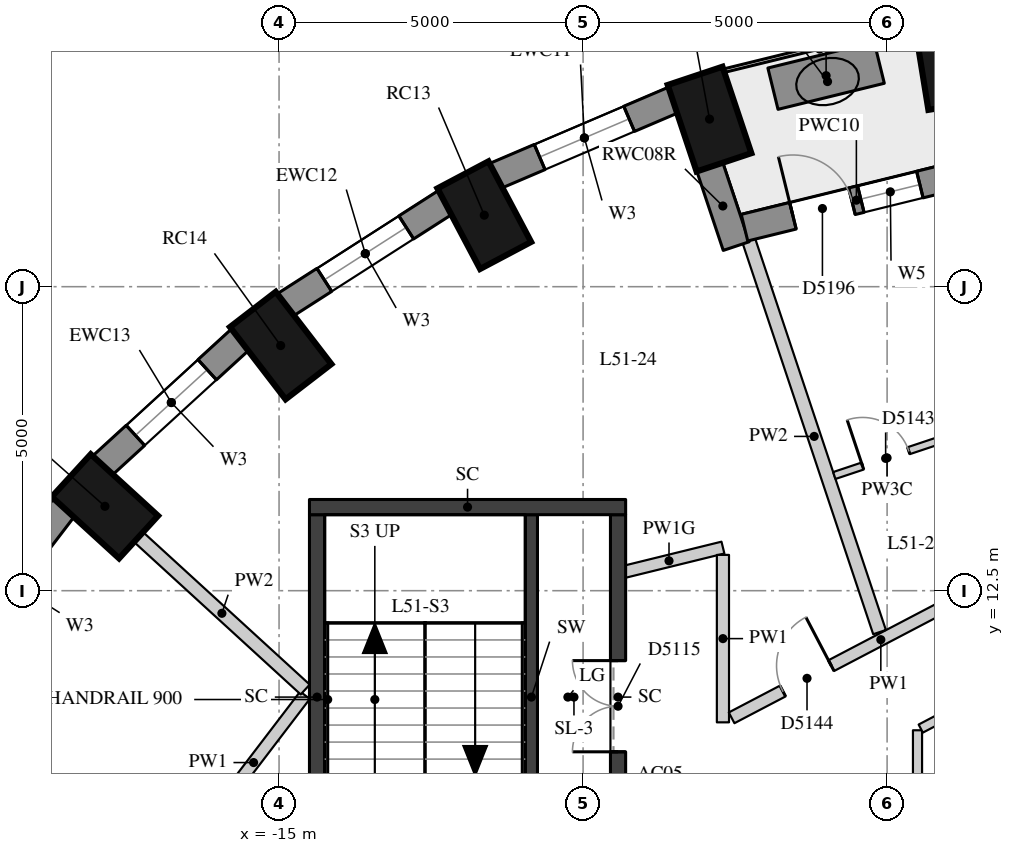
"""IFC4 building model, lengths in metres.
Left out: names, types, materials, properties, quantities, classifications, styles, units other than length and angle.
Written with IfcOpenShell. Run it as: python <this file> out.ifc"""

import sys

from ifc_helpers import new_model, si_unit, direction, frame, frame_2d, origin, origin_2d, place, context, subcontext, project, spatial, rectangle, extrude, element, fill, save


model = new_model("IFC4")
c1 = context("Model", 3, precision=1e-05, world=origin(), true_north=direction((0.0, 1.0)))
c2 = subcontext(c1, "Body", "Model", "MODEL_VIEW")
j1 = project(units=[si_unit("LENGTHUNIT", "METRE"), si_unit("PLANEANGLEUNIT", "RADIAN")], contexts=[c1])
p1 = place(None, origin())
s1 = spatial("IfcSite", under=j1, at=p1, CompositionType="ELEMENT")
p2 = place(p1, origin())
s2 = spatial("IfcBuilding", under=s1, at=p2, CompositionType="ELEMENT")
p3 = place(p2, frame((0.0, 0.0, 181.4)))
s3 = spatial("IfcBuildingStorey", under=s2, at=p3, CompositionType="ELEMENT", Elevation=181.4)
for number, where, z_axis, x_axis in (
    (1, (-3.972, 21.224, 0.0), (0.0, 0.0, 1.0), (-0.16, 0.987, 0.0)),
    (2, (-7.92, 20.256, 0.0), (0.0, 0.0, 1.0), (-0.317, 0.949, 0.0)),
    (3, (-11.625, 18.676, 0.0), (0.0, 0.0, 1.0), (-0.468, 0.884, 0.0)),
    (4, (-14.973, 16.532, 0.0), (0.0, 0.0, 1.0), (-0.61, 0.792, 0.0)),
    (5, (-17.864, 13.888, 0.0), (0.0, 0.0, 1.0), (-0.738, 0.675, 0.0)),
):
    element("IfcColumn", number, at=place(p3, frame(where, z_axis=z_axis, x_axis=x_axis)), inside=s3, PredefinedType="COLUMN", context=c2, shape_type="SweptSolid", body=[
        extrude(rectangle(XDim=1.5, YDim=0.95, at=origin_2d()), origin(), (0.0, 0.0, 1.0), 3.3),
    ])
p4 = place(p3, frame((-8.506, 20.574, 0.0), z_axis=(0.0, 0.0, 1.0), x_axis=(-0.919798725687, -0.392390499663, 0.0)))
e6 = element("IfcWall", 6, at=p4, inside=s3, PredefinedType="SOLIDWALL", context=c2, shape_type="SweptSolid", body=[
    extrude(rectangle(XDim=3.2, YDim=0.45, at=frame_2d((1.6, 0.0))), origin(), (0.0, 0.0, 1.0), 2.85),
])
p5 = place(p4, frame((0.8, 0.0, 0.4)))
e7 = element("IfcOpeningElement", 7, at=p5, cuts=e6, PredefinedType="OPENING", context=c2, shape_type="SweptSolid", body=[
    extrude(rectangle(XDim=1.6, YDim=1.75, at=frame_2d((0.8, 0.875))), frame((0.0, 0.235, 0.0), z_axis=(0.0, -1.0, 0.0), x_axis=(1.0, 0.0, 0.0)), (0.0, 0.0, 1.0), 0.47),
])
p6 = place(p3, frame((-12.255, 18.893, 0.0), z_axis=(0.0, 0.0, 1.0), x_axis=(-0.842030726237, -0.539429565442, 0.0)))
e8 = element("IfcWall", 8, at=p6, inside=s3, PredefinedType="SOLIDWALL", context=c2, shape_type="SweptSolid", body=[
    extrude(rectangle(XDim=3.151, YDim=0.45, at=frame_2d((1.576, 0.0))), origin(), (0.0, 0.0, 1.0), 2.85),
])
p7 = place(p6, frame((0.776, 0.0, 0.4)))
e9 = element("IfcOpeningElement", 9, at=p7, cuts=e8, PredefinedType="OPENING", context=c2, shape_type="SweptSolid", body=[
    extrude(rectangle(XDim=1.6, YDim=1.75, at=frame_2d((0.8, 0.875))), frame((0.0, 0.235, 0.0), z_axis=(0.0, -1.0, 0.0), x_axis=(1.0, 0.0, 0.0)), (0.0, 0.0, 1.0), 0.47),
])
p8 = place(p3, frame((-15.63, 16.639, 0.0), z_axis=(0.0, 0.0, 1.0), x_axis=(-0.737808755941, -0.675009807082, 0.0)))
e10 = element("IfcWall", 10, at=p8, inside=s3, PredefinedType="SOLIDWALL", context=c2, shape_type="SweptSolid", body=[
    extrude(rectangle(XDim=3.094, YDim=0.45, at=frame_2d((1.547, 0.0))), origin(), (0.0, 0.0, 1.0), 2.85),
])
p9 = place(p8, frame((0.747, 0.0, 0.4)))
e11 = element("IfcOpeningElement", 11, at=p9, cuts=e10, PredefinedType="OPENING", context=c2, shape_type="SweptSolid", body=[
    extrude(rectangle(XDim=1.6, YDim=1.75, at=frame_2d((0.8, 0.875))), frame((0.0, 0.235, 0.0), z_axis=(0.0, -1.0, 0.0), x_axis=(1.0, 0.0, 0.0)), (0.0, 0.0, 1.0), 0.47),
])
p10 = place(p3, frame((-18.528, 13.879, 0.0), z_axis=(0.0, 0.0, 1.0), x_axis=(-0.607817056371, -0.794077090706, 0.0)))
e12 = element("IfcWall", 12, at=p10, inside=s3, PredefinedType="SOLIDWALL", context=c2, shape_type="SweptSolid", body=[
    extrude(rectangle(XDim=3.037, YDim=0.45, at=frame_2d((1.519, 0.0))), origin(), (0.0, 0.0, 1.0), 2.85),
])
p11 = place(p10, frame((0.719, 0.0, 0.4)))
e13 = element("IfcOpeningElement", 13, at=p11, cuts=e12, PredefinedType="OPENING", context=c2, shape_type="SweptSolid", body=[
    extrude(rectangle(XDim=1.6, YDim=1.75, at=frame_2d((0.8, 0.875))), frame((0.0, 0.235, 0.0), z_axis=(0.0, -1.0, 0.0), x_axis=(1.0, 0.0, 0.0)), (0.0, 0.0, 1.0), 0.47),
])
p12 = place(p3, frame((-7.922, 19.486, 0.0), z_axis=(0.0, 0.0, 1.0), x_axis=(0.316649231286, -0.948542705589, 0.0)))
e14 = element("IfcWall", 14, at=p12, inside=s3, PredefinedType="SOLIDWALL", context=c2, shape_type="SweptSolid", body=[
    extrude(rectangle(XDim=1.39, YDim=0.45, at=frame_2d((0.695, 0.0))), origin(), (0.0, 0.0, 1.0), 2.85),
])
p13 = place(p3, frame((-3.665, 19.375, 0.0), z_axis=(0.0, 0.0, 1.0), x_axis=(-0.97110866251, -0.238637728782, 0.0)))
e15 = element("IfcWall", 15, at=p13, inside=s3, PredefinedType="SOLIDWALL", context=c2, shape_type="SweptSolid", body=[
    extrude(rectangle(XDim=3.789, YDim=0.45, at=frame_2d((1.895, 0.0))), origin(), (0.0, 0.0, 1.0), 2.85),
])
p14 = place(p13, frame((0.82, 0.0, 0.4)))
e16 = element("IfcOpeningElement", 16, at=p14, cuts=e15, PredefinedType="OPENING", context=c2, shape_type="SweptSolid", body=[
    extrude(rectangle(XDim=1.0, YDim=1.75, at=frame_2d((0.5, 0.875))), frame((0.0, 0.235, 0.0), z_axis=(0.0, -1.0, 0.0), x_axis=(1.0, 0.0, 0.0)), (0.0, 0.0, 1.0), 0.47),
])
p15 = place(p13, frame((1.97, 0.0, 0.0)))
e17 = element("IfcOpeningElement", 17, at=p15, cuts=e15, PredefinedType="OPENING", context=c2, shape_type="SweptSolid", body=[
    extrude(rectangle(XDim=1.0, YDim=2.15, at=frame_2d((0.5, 1.075))), frame((0.0, 0.235, 0.0), z_axis=(0.0, -1.0, 0.0), x_axis=(1.0, 0.0, 0.0)), (0.0, 0.0, 1.0), 0.47),
])
p16 = place(p3, frame((-5.129, 21.185, 0.0), z_axis=(0.0, 0.0, 1.0), x_axis=(-0.971257007956, -0.238033242419, 0.0)))
e18 = element("IfcWall", 18, at=p16, inside=s3, PredefinedType="USERDEFINED", context=c2, shape_type="SweptSolid", body=[
    extrude(rectangle(XDim=1.8, YDim=0.7, at=frame_2d((0.9, 0.0))), origin(), (0.0, 0.0, 1.0), 0.75),
])
p17 = place(p3, frame((-10.85, 7.75, 0.0), z_axis=(0.0, 0.0, 1.0), x_axis=(0.0, 1.0, 0.0)))
e19 = element("IfcWall", 19, at=p17, inside=s3, PredefinedType="SHEAR", context=c2, shape_type="SweptSolid", body=[
    extrude(rectangle(XDim=6.0, YDim=0.2, at=frame_2d((3.0, 0.0))), origin(), (0.0, 0.0, 1.0), 2.85),
])
p18 = place(p17, frame((0.1, 0.0, 0.0)))
e20 = element("IfcOpeningElement", 20, at=p18, cuts=e19, PredefinedType="OPENING", context=c2, shape_type="SweptSolid", body=[
    extrude(rectangle(XDim=1.5, YDim=2.1, at=frame_2d((0.75, 1.05))), frame((0.0, 0.11, 0.0), z_axis=(0.0, -1.0, 0.0), x_axis=(1.0, 0.0, 0.0)), (0.0, 0.0, 1.0), 0.22),
])
p19 = place(p3, frame((-14.375, 7.75, -0.28), z_axis=(0.0, 0.0, 1.0), x_axis=(0.0, 1.0, 0.0)))
e21 = element("IfcWall", 21, at=p19, inside=s3, PredefinedType="SHEAR", context=c2, shape_type="SweptSolid", body=[
    extrude(rectangle(XDim=6.0, YDim=0.25, at=frame_2d((3.0, 0.0))), origin(), (0.0, 0.0, 1.0), 3.13),
])
p20 = place(p3, frame((-9.425, 7.75, -0.28), z_axis=(0.0, 0.0, 1.0), x_axis=(0.0, 1.0, 0.0)))
e22 = element("IfcWall", 22, at=p20, inside=s3, PredefinedType="SHEAR", context=c2, shape_type="SweptSolid", body=[
    extrude(rectangle(XDim=6.0, YDim=0.25, at=frame_2d((3.0, 0.0))), origin(), (0.0, 0.0, 1.0), 3.13),
])
p21 = place(p20, frame((2.1, 0.0, 0.28)))
e23 = element("IfcOpeningElement", 23, at=p21, cuts=e22, PredefinedType="OPENING", context=c2, shape_type="SweptSolid", body=[
    extrude(rectangle(XDim=1.5, YDim=2.1, at=frame_2d((0.75, 1.05))), frame((0.0, 0.135, 0.0), z_axis=(0.0, -1.0, 0.0), x_axis=(1.0, 0.0, 0.0)), (0.0, 0.0, 1.0), 0.27),
])
p22 = place(p3, frame((-14.5, 13.875, -0.28), z_axis=(0.0, 0.0, 1.0), x_axis=(1.0, 0.0, 0.0)))
e24 = element("IfcWall", 24, at=p22, inside=s3, PredefinedType="SHEAR", context=c2, shape_type="SweptSolid", body=[
    extrude(rectangle(XDim=5.2, YDim=0.25, at=frame_2d((2.6, 0.0))), origin(), (0.0, 0.0, 1.0), 3.13),
])
p23 = place(p3, frame((-16.263, 8.566, 0.0), z_axis=(0.0, 0.0, 1.0), x_axis=(0.606668946119, 0.794954583492, 0.0)))
e25 = element("IfcWall", 25, at=p23, inside=s3, PredefinedType="PARTITIONING", context=c2, shape_type="SweptSolid", body=[
    extrude(rectangle(XDim=2.785, YDim=0.2, at=frame_2d((1.393, 0.0))), origin(), (0.0, 0.0, 1.0), 2.85),
])
p24 = place(p3, frame((-9.474, 12.773, 0.0), z_axis=(0.0, 0.0, 1.0), x_axis=(0.971086426401, 0.238728197874, 0.0)))
e26 = element("IfcWall", 26, at=p24, inside=s3, PredefinedType="PARTITIONING", context=c2, shape_type="SweptSolid", body=[
    extrude(rectangle(XDim=1.826, YDim=0.2, at=frame_2d((0.913, 0.0))), origin(), (0.0, 0.0, 1.0), 2.4),
])
p25 = place(p3, frame((-7.7, 13.089, 0.0), z_axis=(0.0, 0.0, 1.0), x_axis=(0.0, -1.0, 0.0)))
e27 = element("IfcWall", 27, at=p25, inside=s3, PredefinedType="PARTITIONING", context=c2, shape_type="SweptSolid", body=[
    extrude(rectangle(XDim=2.754, YDim=0.2, at=frame_2d((1.377, 0.0))), origin(), (0.0, 0.0, 1.0), 2.85),
])
p26 = place(p3, frame((-7.557, 10.409, 0.0), z_axis=(0.0, 0.0, 1.0), x_axis=(0.885861719566, 0.463949365565, 0.0)))
e28 = element("IfcWall", 28, at=p26, inside=s3, PredefinedType="PARTITIONING", context=c2, shape_type="SweptSolid", body=[
    extrude(rectangle(XDim=5.541, YDim=0.2, at=frame_2d((2.77, 0.0))), origin(), (0.0, 0.0, 1.0), 2.85),
])
p27 = place(p26, frame((0.95, 0.0, 0.0)))
e29 = element("IfcOpeningElement", 29, at=p27, cuts=e28, PredefinedType="OPENING", context=c2, shape_type="SweptSolid", body=[
    extrude(rectangle(XDim=0.9, YDim=2.1, at=frame_2d((0.45, 1.05))), frame((0.0, 0.11, 0.0), z_axis=(0.0, -1.0, 0.0), x_axis=(1.0, 0.0, 0.0)), (0.0, 0.0, 1.0), 0.22),
])
p28 = place(p3, frame((-4.5, 8.356, 0.0), z_axis=(0.0, 0.0, 1.0), x_axis=(0.0, 1.0, 0.0)))
e30 = element("IfcWall", 30, at=p28, inside=s3, PredefinedType="PARTITIONING", context=c2, shape_type="SweptSolid", body=[
    extrude(rectangle(XDim=1.848, YDim=0.15, at=frame_2d((0.924, 0.0))), origin(), (0.0, 0.0, 1.0), 2.85),
])
p29 = place(p3, frame((-4.447, 10.232, 0.0), z_axis=(0.0, 0.0, 1.0), x_axis=(0.885843659857, 0.463983847016, 0.0)))
e31 = element("IfcWall", 31, at=p29, inside=s3, PredefinedType="PARTITIONING", context=c2, shape_type="SweptSolid", body=[
    extrude(rectangle(XDim=2.365, YDim=0.15, at=frame_2d((1.182, 0.0))), origin(), (0.0, 0.0, 1.0), 2.85),
])
p30 = place(p3, frame((-7.274, 18.256, 0.0), z_axis=(0.0, 0.0, 1.0), x_axis=(0.316724121691, -0.948517701859, 0.0)))
e32 = element("IfcWall", 32, at=p30, inside=s3, PredefinedType="PARTITIONING", context=c2, shape_type="SweptSolid", body=[
    extrude(rectangle(XDim=6.787, YDim=0.22, at=frame_2d((3.394, 0.0))), origin(), (0.0, 0.0, 1.0), 2.85),
])
p31 = place(p3, frame((-17.31, 13.382, 0.0), z_axis=(0.0, 0.0, 1.0), x_axis=(0.737827699829, -0.674989100182, 0.0)))
e33 = element("IfcWall", 33, at=p31, inside=s3, PredefinedType="PARTITIONING", context=c2, shape_type="SweptSolid", body=[
    extrude(rectangle(XDim=3.714, YDim=0.22, at=frame_2d((1.857, 0.0))), origin(), (0.0, 0.0, 1.0), 2.85),
])
p32 = place(p3, frame((-4.133, 14.974, 0.0), z_axis=(0.0, 0.0, 1.0), x_axis=(-0.9485230882, -0.31670799035, 0.0)))
e34 = element("IfcWall", 34, at=p32, inside=s3, PredefinedType="PARTITIONING", context=c2, shape_type="SweptSolid", body=[
    extrude(rectangle(XDim=1.83, YDim=0.12, at=frame_2d((0.915, 0.0))), origin(), (0.0, 0.0, 1.0), 2.4),
])
p33 = place(p32, frame((0.54, 0.0, 0.0)))
e35 = element("IfcOpeningElement", 35, at=p33, cuts=e34, PredefinedType="OPENING", context=c2, shape_type="SweptSolid", body=[
    extrude(rectangle(XDim=0.8, YDim=2.1, at=frame_2d((0.4, 1.05))), frame((0.0, 0.07, 0.0), z_axis=(0.0, -1.0, 0.0), x_axis=(1.0, 0.0, 0.0)), (0.0, 0.0, 1.0), 0.14),
])
p34 = place(p5, origin())
e36 = element("IfcWindow", 36, at=p34, inside=s3, PartitioningType="SINGLE_PANEL", PredefinedType="WINDOW", context=c2, shape_type="SweptSolid", body=[
    extrude(rectangle(XDim=1.6, YDim=1.75, at=frame_2d((0.8, 0.875))), frame((0.0, 0.035, 0.0), z_axis=(0.0, -1.0, 0.0), x_axis=(1.0, 0.0, 0.0)), (0.0, 0.0, 1.0), 0.06),
])
fill(e7, e36)
p35 = place(p7, origin())
e37 = element("IfcWindow", 37, at=p35, inside=s3, PartitioningType="SINGLE_PANEL", PredefinedType="WINDOW", context=c2, shape_type="SweptSolid", body=[
    extrude(rectangle(XDim=1.6, YDim=1.75, at=frame_2d((0.8, 0.875))), frame((0.0, 0.035, 0.0), z_axis=(0.0, -1.0, 0.0), x_axis=(1.0, 0.0, 0.0)), (0.0, 0.0, 1.0), 0.06),
])
fill(e9, e37)
p36 = place(p9, origin())
e38 = element("IfcWindow", 38, at=p36, inside=s3, PartitioningType="SINGLE_PANEL", PredefinedType="WINDOW", context=c2, shape_type="SweptSolid", body=[
    extrude(rectangle(XDim=1.6, YDim=1.75, at=frame_2d((0.8, 0.875))), frame((0.0, 0.035, 0.0), z_axis=(0.0, -1.0, 0.0), x_axis=(1.0, 0.0, 0.0)), (0.0, 0.0, 1.0), 0.06),
])
fill(e11, e38)
p37 = place(p14, origin())
e39 = element("IfcWindow", 39, at=p37, inside=s3, PartitioningType="SINGLE_PANEL", PredefinedType="WINDOW", context=c2, shape_type="SweptSolid", body=[
    extrude(rectangle(XDim=1.0, YDim=1.75, at=frame_2d((0.5, 0.875))), frame((0.0, 0.035, 0.0), z_axis=(0.0, -1.0, 0.0), x_axis=(1.0, 0.0, 0.0)), (0.0, 0.0, 1.0), 0.06),
])
fill(e16, e39)
p38 = place(p15, frame((1.0, 0.0, 0.0), z_axis=(0.0, 0.0, 1.0), x_axis=(-1.0, 0.0, 0.0)))
e40 = element("IfcDoor", 40, at=p38, inside=s3, OperationType="SINGLE_SWING_LEFT", PredefinedType="DOOR", context=c2, shape_type="SweptSolid", body=[
    extrude(rectangle(XDim=1.0, YDim=2.15, at=frame_2d((0.5, 1.075))), frame((0.0, 0.075, 0.0), z_axis=(0.0, -1.0, 0.0), x_axis=(1.0, 0.0, 0.0)), (0.0, 0.0, 1.0), 0.05),
])
fill(e17, e40)
p39 = place(p21, origin())
e41 = element("IfcDoor", 41, at=p39, inside=s3, OperationType="DOUBLE_DOOR_SINGLE_SWING", PredefinedType="DOOR", context=c2, shape_type="SweptSolid", body=[
    extrude(rectangle(XDim=1.5, YDim=2.1, at=frame_2d((0.75, 1.05))), frame((0.0, 0.025, 0.0), z_axis=(0.0, -1.0, 0.0), x_axis=(1.0, 0.0, 0.0)), (0.0, 0.0, 1.0), 0.05),
])
fill(e23, e41)
p40 = place(p33, origin())
e42 = element("IfcDoor", 42, at=p40, inside=s3, OperationType="SINGLE_SWING_LEFT", PredefinedType="DOOR", context=c2, shape_type="SweptSolid", body=[
    extrude(rectangle(XDim=0.8, YDim=2.1, at=frame_2d((0.4, 1.05))), frame((0.0, 0.025, 0.0), z_axis=(0.0, -1.0, 0.0), x_axis=(1.0, 0.0, 0.0)), (0.0, 0.0, 1.0), 0.05),
])
fill(e35, e42)
p41 = place(p27, origin())
e43 = element("IfcDoor", 43, at=p41, inside=s3, OperationType="SINGLE_SWING_RIGHT", PredefinedType="DOOR", context=c2, shape_type="SweptSolid", body=[
    extrude(rectangle(XDim=0.9, YDim=2.1, at=frame_2d((0.45, 1.05))), frame((0.0, 0.025, 0.0), z_axis=(0.0, -1.0, 0.0), x_axis=(1.0, 0.0, 0.0)), (0.0, 0.0, 1.0), 0.05),
])
fill(e29, e43)
save(model, sys.argv[1])
